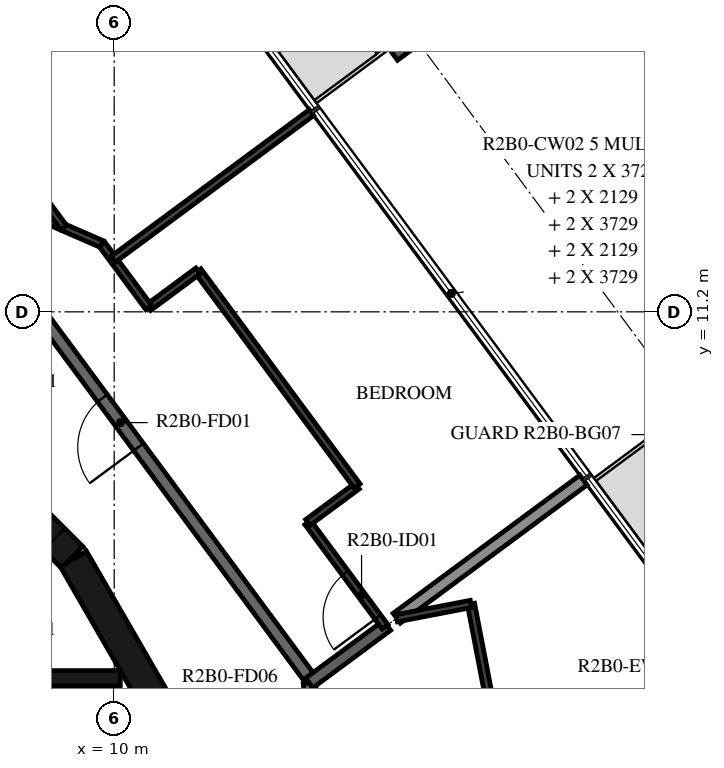
"""IFC4 building model, lengths in metres.
Left out: names, types, materials, properties, quantities, classifications, styles, units other than length and angle.
Written with IfcOpenShell. Run it as: python <this file> out.ifc"""

import sys

from ifc_helpers import new_model, si_unit, direction, frame, frame_2d, origin, origin_2d, place, context, subcontext, project, spatial, polyline, rectangle, i_section, outline, extrude, element, fill, save


model = new_model("IFC4")
c1 = context("Model", 3, precision=1e-05, world=origin(), true_north=direction((0.0, 1.0)))
c2 = subcontext(c1, "Body", "Model", "MODEL_VIEW")
j1 = project(units=[si_unit("LENGTHUNIT", "METRE"), si_unit("PLANEANGLEUNIT", "RADIAN")], contexts=[c1])
p1 = place(None, origin())
s1 = spatial("IfcSite", under=j1, at=p1, CompositionType="ELEMENT")
p2 = place(p1, origin())
s2 = spatial("IfcBuilding", under=s1, at=p2, CompositionType="ELEMENT")
p3 = place(p2, frame((0.0, 0.0, 90.7)))
s3 = spatial("IfcBuildingStorey", under=s2, at=p3, CompositionType="ELEMENT", Elevation=90.7)
p4 = place(p3, frame((14.932, 15.726, -0.38), z_axis=(0.0, 0.0, 1.0), x_axis=(0.594822857897, -0.803856807972, 0.0)))
e1 = element("IfcColumn", 1, at=p4, inside=s3, PredefinedType="COLUMN", context=c2, shape_type="SweptSolid", body=[
    extrude(i_section(OverallWidth=0.3, OverallDepth=0.9, WebThickness=0.019, FlangeThickness=0.035, FilletRadius=0.03, at=origin_2d()), origin(), (0.0, 0.0, 1.0), 3.5),
])
p5 = place(p3, frame((10.845, 4.51, 0.0), z_axis=(0.0, 0.0, 1.0), x_axis=(-0.500087131594, 0.865975092491, 0.0)))
e2 = element("IfcWall", 2, at=p5, inside=s3, PredefinedType="SHEAR", context=c2, shape_type="SweptSolid", body=[
    extrude(rectangle(XDim=3.033, YDim=0.5, at=frame_2d((1.516, 0.0))), origin(), (0.0, 0.0, 1.0), 3.12),
])
p6 = place(p3, frame((9.308, 7.164, 0.0), z_axis=(0.0, 0.0, 1.0), x_axis=(-0.707106781187, 0.707106781187, 0.0)))
e3 = element("IfcWall", 3, at=p6, inside=s3, PredefinedType="SHEAR", context=c2, shape_type="SweptSolid", body=[
    extrude(rectangle(XDim=3.032, YDim=0.5, at=frame_2d((1.516, 0.0))), origin(), (0.0, 0.0, 1.0), 3.12),
])
p7 = place(p6, frame((0.416, 0.0, 0.0)))
e4 = element("IfcOpeningElement", 4, at=p7, cuts=e3, PredefinedType="OPENING", context=c2, shape_type="SweptSolid", body=[
    extrude(rectangle(XDim=1.2, YDim=2.1, at=frame_2d((0.6, 1.05))), frame((0.0, 0.26, 0.0), z_axis=(0.0, -1.0, 0.0), x_axis=(1.0, 0.0, 0.0)), (0.0, 0.0, 1.0), 0.52),
])
p8 = place(p3, frame((7.0, 5.175, 0.0), z_axis=(0.0, 0.0, 1.0), x_axis=(1.0, 0.0, 0.0)))
e5 = element("IfcWall", 5, at=p8, inside=s3, PredefinedType="SHEAR", context=c2, shape_type="SweptSolid", body=[
    extrude(rectangle(XDim=3.1, YDim=0.25, at=frame_2d((1.55, 0.0))), origin(), (0.0, 0.0, 1.0), 3.12),
])
p9 = place(p3, origin())
e6 = element("IfcWall", 6, at=p9, inside=s3, PredefinedType="SHEAR", context=c2, shape_type="SweptSolid", body=[
    extrude(outline(polyline([(-9.55, 4.8), (-7.65, 4.8), (-7.65, 1.9), (-7.4, 1.9), (-7.4, 4.8), (-5.5, 4.8), (-5.5, 1.9), (-5.25, 1.9), (-5.25, 4.8), (-3.35, 4.8), (-3.35, 1.9), (-3.1, 1.9), (-3.1, 4.8), (-1.2, 4.8), (-1.2, 1.9), (-0.95, 1.9), (-0.95, 4.8), (0.95, 4.8), (0.95, 1.9), (1.2, 1.9), (1.2, 4.8), (3.1, 4.8), (3.1, 1.9), (3.35, 1.9), (3.35, 4.8), (5.25, 4.8), (5.25, 1.9), (5.5, 1.9), (5.5, 4.8), (7.4, 4.8), (7.4, 1.9), (7.65, 1.9), (7.65, 4.8), (9.55, 4.8), (9.55, 1.9), (9.8, 1.9), (9.8, 4.8), (9.8, 5.05), (-9.8, 5.05), (-9.8, 4.8), (-9.8, 1.9), (-9.55, 1.9), (-9.55, 4.8)])), origin(), (0.0, 0.0, 1.0), 3.12),
])
p10 = place(p3, frame((13.196, 5.198, 0.0), z_axis=(0.0, 0.0, 1.0), x_axis=(-0.594805187394, 0.803869883159, 0.0)))
e7 = element("IfcWall", 7, at=p10, inside=s3, PredefinedType="STANDARD", context=c2, shape_type="SweptSolid", body=[
    extrude(rectangle(XDim=7.342, YDim=0.2, at=frame_2d((3.671, 0.0))), origin(), (0.0, 0.0, 1.0), 3.12),
])
p11 = place(p10, frame((4.7, 0.0, 0.0)))
e8 = element("IfcOpeningElement", 8, at=p11, cuts=e7, PredefinedType="OPENING", context=c2, shape_type="SweptSolid", body=[
    extrude(rectangle(XDim=1.0, YDim=2.1, at=frame_2d((0.5, 1.05))), frame((0.0, 0.11, 0.0), z_axis=(0.0, -1.0, 0.0), x_axis=(1.0, 0.0, 0.0)), (0.0, 0.0, 1.0), 0.22),
])
p12 = place(p3, frame((14.028, -2.096, 0.0), z_axis=(0.0, 0.0, 1.0), x_axis=(-0.113207047924, 0.993571418822, 0.0)))
e9 = element("IfcWall", 9, at=p12, inside=s3, PredefinedType="STANDARD", context=c2, shape_type="SweptSolid", body=[
    extrude(rectangle(XDim=7.24, YDim=0.2, at=frame_2d((3.62, 0.0))), origin(), (0.0, 0.0, 1.0), 3.12),
])
p13 = place(p12, frame((6.04, 0.0, 0.0)))
e10 = element("IfcOpeningElement", 10, at=p13, cuts=e9, PredefinedType="OPENING", context=c2, shape_type="SweptSolid", body=[
    extrude(rectangle(XDim=1.0, YDim=2.1, at=frame_2d((0.5, 1.05))), frame((0.0, 0.11, 0.0), z_axis=(0.0, -1.0, 0.0), x_axis=(1.0, 0.0, 0.0)), (0.0, 0.0, 1.0), 0.22),
])
p14 = place(p3, frame((13.208, 5.097, 0.0), z_axis=(0.0, 0.0, 1.0), x_axis=(0.803831627965, 0.594856885211, 0.0)))
e11 = element("IfcWall", 11, at=p14, inside=s3, PredefinedType="STANDARD", context=c2, shape_type="SweptSolid", body=[
    extrude(rectangle(XDim=1.591, YDim=0.2, at=frame_2d((0.796, 0.0))), origin(), (0.0, 0.0, 1.0), 3.12),
])
p15 = place(p3, frame((14.647, 6.161, 0.0), z_axis=(0.0, 0.0, 1.0), x_axis=(0.803842510616, 0.594842179175, 0.0)))
e12 = element("IfcWall", 12, at=p15, inside=s3, PredefinedType="STANDARD", context=c2, shape_type="SweptSolid", body=[
    extrude(rectangle(XDim=3.819, YDim=0.2, at=frame_2d((1.909, 0.0))), origin(), (0.0, 0.0, 1.0), 2.73),
])
p16 = place(p3, frame((14.455, 6.019, 0.0), z_axis=(0.0, 0.0, 1.0), x_axis=(-0.594792774379, 0.803879067737, 0.0)))
e13 = element("IfcWall", 13, at=p16, inside=s3, PredefinedType="PARTITIONING", context=c2, shape_type="SweptSolid", body=[
    extrude(rectangle(XDim=2.136, YDim=0.12, at=frame_2d((1.068, 0.0))), origin(), (0.0, 0.0, 1.0), 3.12),
])
p17 = place(p16, frame((0.2, 0.0, 0.0)))
e14 = element("IfcOpeningElement", 14, at=p17, cuts=e13, PredefinedType="OPENING", context=c2, shape_type="SweptSolid", body=[
    extrude(rectangle(XDim=0.9, YDim=2.1, at=frame_2d((0.45, 1.05))), frame((0.0, 0.07, 0.0), z_axis=(0.0, -1.0, 0.0), x_axis=(1.0, 0.0, 0.0)), (0.0, 0.0, 1.0), 0.14),
])
p18 = place(p3, frame((13.185, 7.736, 0.0), z_axis=(0.0, 0.0, 1.0), x_axis=(0.803934518159, 0.594717824277, 0.0)))
e15 = element("IfcWall", 15, at=p18, inside=s3, PredefinedType="PARTITIONING", context=c2, shape_type="SweptSolid", body=[
    extrude(rectangle(XDim=1.008, YDim=0.12, at=frame_2d((0.504, 0.0))), origin(), (0.0, 0.0, 1.0), 3.12),
])
p19 = place(p3, frame((13.995, 8.336, 0.0), z_axis=(0.0, 0.0, 1.0), x_axis=(-0.59480284986, 0.803871612758, 0.0)))
e16 = element("IfcWall", 16, at=p19, inside=s3, PredefinedType="PARTITIONING", context=c2, shape_type="SweptSolid", body=[
    extrude(rectangle(XDim=4.4, YDim=0.12, at=frame_2d((2.2, 0.0))), origin(), (0.0, 0.0, 1.0), 3.12),
])
p20 = place(p3, frame((11.378, 11.873, 0.0), z_axis=(0.0, 0.0, 1.0), x_axis=(-0.803818744753, -0.594874293934, 0.0)))
e17 = element("IfcWall", 17, at=p20, inside=s3, PredefinedType="PARTITIONING", context=c2, shape_type="SweptSolid", body=[
    extrude(rectangle(XDim=1.008, YDim=0.12, at=frame_2d((0.504, 0.0))), origin(), (0.0, 0.0, 1.0), 3.12),
])
p21 = place(p3, frame((10.567, 11.273, 0.0), z_axis=(0.0, 0.0, 1.0), x_axis=(-0.594957357743, 0.803757265888, 0.0)))
e18 = element("IfcWall", 18, at=p21, inside=s3, PredefinedType="PARTITIONING", context=c2, shape_type="SweptSolid", body=[
    extrude(rectangle(XDim=1.297, YDim=0.12, at=frame_2d((0.648, 0.0))), origin(), (0.0, 0.0, 1.0), 3.12),
])
p22 = place(p3, frame((9.796, 12.315, 0.0), z_axis=(0.0, 0.0, 1.0), x_axis=(-0.917053660722, 0.398763819017, 0.0)))
e19 = element("IfcWall", 19, at=p22, inside=s3, PredefinedType="PARTITIONING", context=c2, shape_type="SweptSolid", body=[
    extrude(rectangle(XDim=7.576, YDim=0.12, at=frame_2d((3.788, 0.0))), origin(), (0.0, 0.0, 1.0), 3.12),
])
p23 = place(p22, frame((2.185, 0.0, 0.0)))
e20 = element("IfcOpeningElement", 20, at=p23, cuts=e19, PredefinedType="OPENING", context=c2, shape_type="SweptSolid", body=[
    extrude(rectangle(XDim=0.8, YDim=2.1, at=frame_2d((0.4, 1.05))), frame((0.0, 0.07, 0.0), z_axis=(0.0, -1.0, 0.0), x_axis=(1.0, 0.0, 0.0)), (0.0, 0.0, 1.0), 0.14),
])
p24 = place(p3, frame((13.244, 14.477, 0.0), z_axis=(0.0, 0.0, 1.0), x_axis=(-0.803853407146, -0.594827453821, 0.0)))
e21 = element("IfcWall", 21, at=p24, inside=s3, PredefinedType="PARTITIONING", context=c2, shape_type="SweptSolid", body=[
    extrude(rectangle(XDim=4.058, YDim=0.12, at=frame_2d((2.029, 0.0))), origin(), (0.0, 0.0, 1.0), 2.73),
])
p25 = place(p3, frame((6.746, 15.862, 0.0), z_axis=(0.0, 0.0, 1.0), x_axis=(0.594836031811, -0.80384705962, 0.0)))
e22 = element("IfcWall", 22, at=p25, inside=s3, PredefinedType="PARTITIONING", context=c2, shape_type="SweptSolid", body=[
    extrude(rectangle(XDim=4.072, YDim=0.12, at=frame_2d((2.036, 0.0))), origin(), (0.0, 0.0, 1.0), 3.12),
])
p26 = place(p3, frame((16.189, 4.728, 0.0), z_axis=(0.0, 0.0, 1.0), x_axis=(-0.18942796612, 0.981894620441, 0.0)))
e23 = element("IfcWall", 23, at=p26, inside=s3, PredefinedType="PARTITIONING", context=c2, shape_type="SweptSolid", body=[
    extrude(rectangle(XDim=1.7, YDim=0.12, at=frame_2d((0.85, 0.0))), origin(), (0.0, 0.0, 1.0), 3.12),
])
p27 = place(p3, frame((15.867, 6.397, 0.0), z_axis=(0.0, 0.0, 1.0), x_axis=(-0.981909648822, -0.189350050303, 0.0)))
e24 = element("IfcWall", 24, at=p27, inside=s3, PredefinedType="PARTITIONING", context=c2, shape_type="SweptSolid", body=[
    extrude(rectangle(XDim=1.243, YDim=0.12, at=frame_2d((0.622, 0.0))), origin(), (0.0, 0.0, 1.0), 3.12),
])
p28 = place(p7, origin())
e25 = element("IfcDoor", 25, at=p28, inside=s3, OperationType="SINGLE_SWING_RIGHT", PredefinedType="DOOR", context=c2, shape_type="SweptSolid", body=[
    extrude(rectangle(XDim=1.2, YDim=2.1, at=frame_2d((0.6, 1.05))), frame((0.0, 0.025, 0.0), z_axis=(0.0, -1.0, 0.0), x_axis=(1.0, 0.0, 0.0)), (0.0, 0.0, 1.0), 0.05),
])
fill(e4, e25)
p29 = place(p11, origin())
e26 = element("IfcDoor", 26, at=p29, inside=s3, OperationType="SINGLE_SWING_RIGHT", PredefinedType="DOOR", context=c2, shape_type="SweptSolid", body=[
    extrude(rectangle(XDim=1.0, YDim=2.1, at=frame_2d((0.5, 1.05))), frame((0.0, 0.025, 0.0), z_axis=(0.0, -1.0, 0.0), x_axis=(1.0, 0.0, 0.0)), (0.0, 0.0, 1.0), 0.05),
])
fill(e8, e26)
p30 = place(p17, origin())
e27 = element("IfcDoor", 27, at=p30, inside=s3, OperationType="SINGLE_SWING_LEFT", PredefinedType="DOOR", context=c2, shape_type="SweptSolid", body=[
    extrude(rectangle(XDim=0.9, YDim=2.1, at=frame_2d((0.45, 1.05))), frame((0.0, 0.025, 0.0), z_axis=(0.0, -1.0, 0.0), x_axis=(1.0, 0.0, 0.0)), (0.0, 0.0, 1.0), 0.05),
])
fill(e14, e27)
save(model, sys.argv[1])
